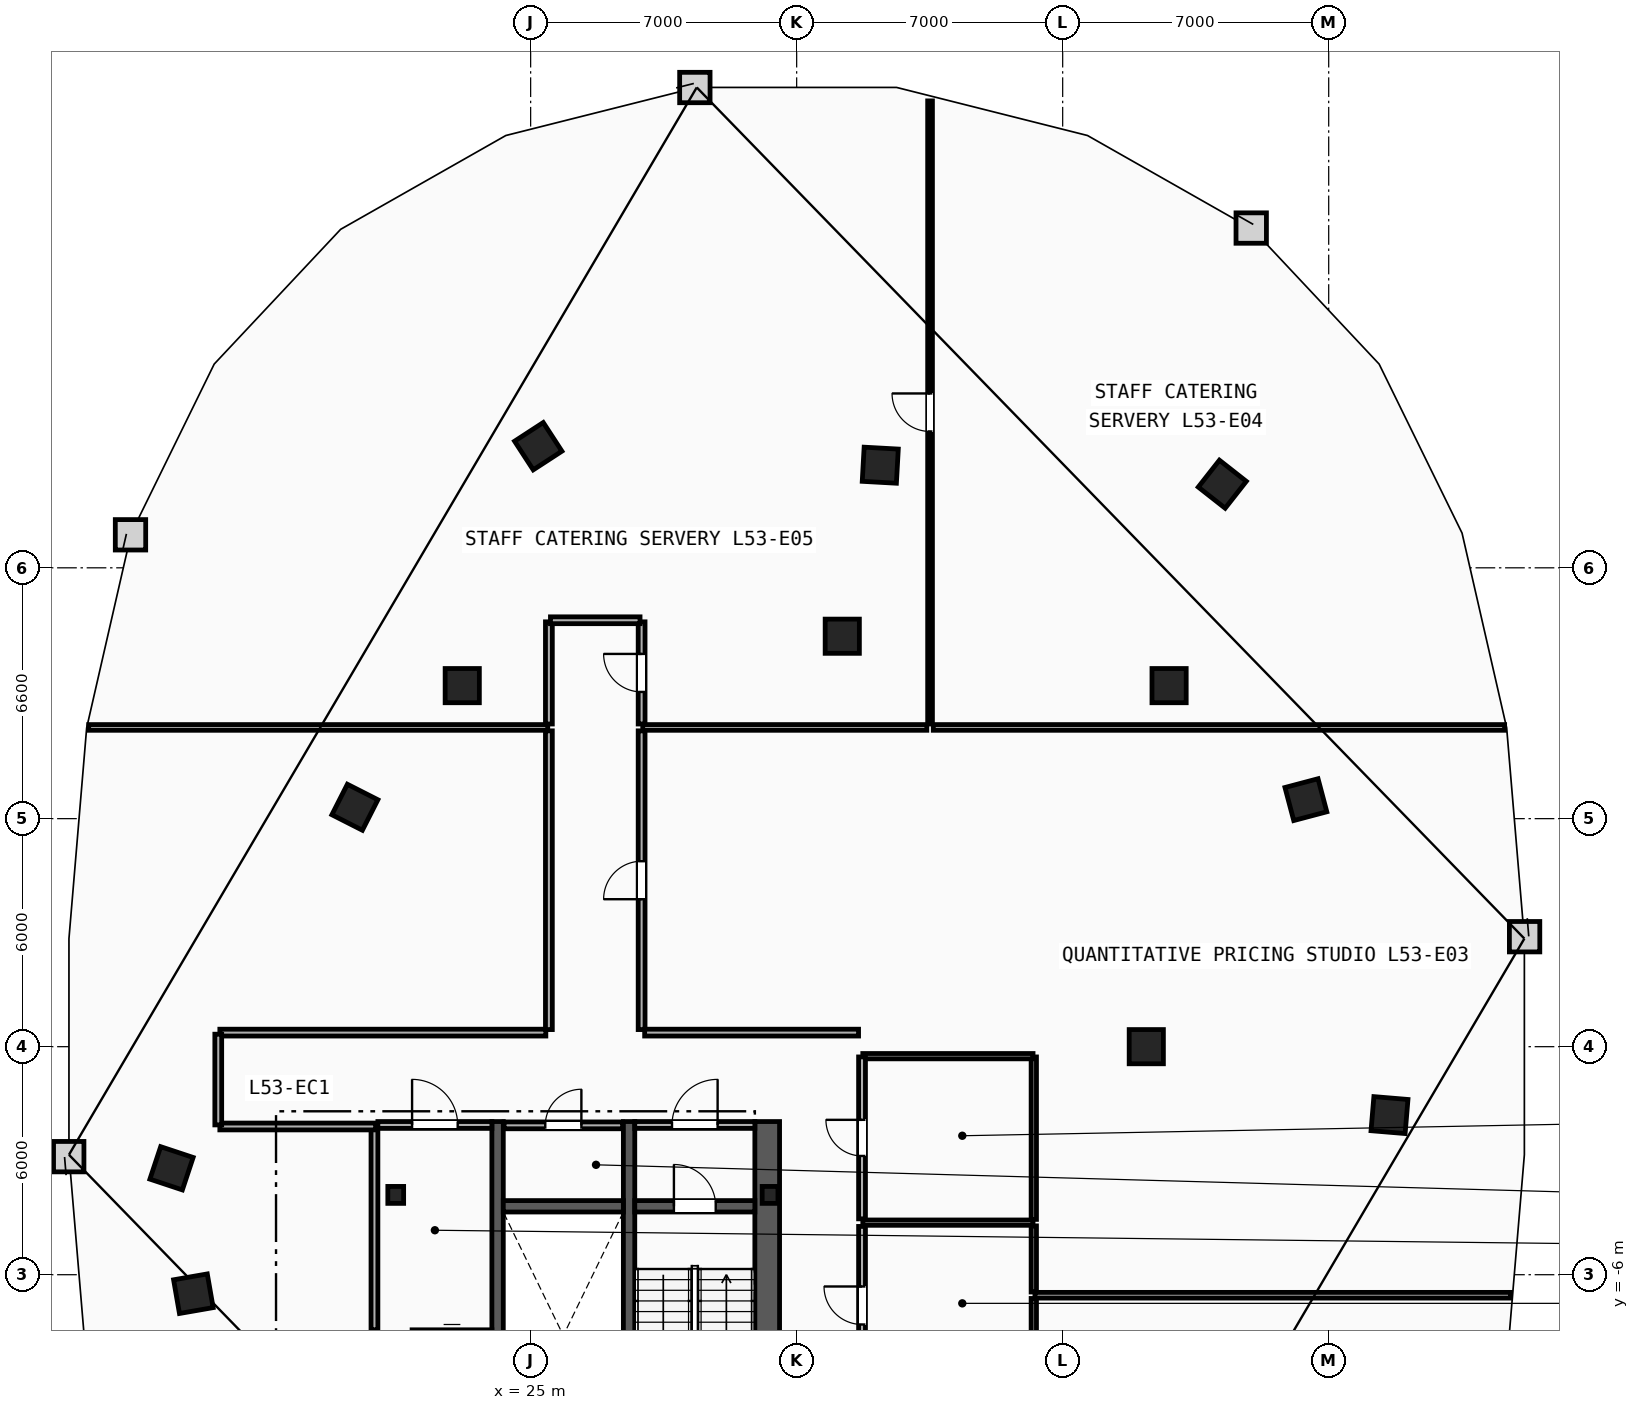
"""IFC4 building model, lengths in metres.
Left out: names, types, materials, properties, quantities, classifications, styles, units other than length and angle.
Written with IfcOpenShell. Run it as: python <this file> out.ifc"""

import sys

from ifc_helpers import new_model, si_unit, direction, frame, frame_2d, origin, origin_2d, place, context, subcontext, project, spatial, rectangle, i_section, extrude, element, fill, save


model = new_model("IFC4")
c1 = context("Model", 3, precision=1e-05, world=origin(), true_north=direction((0.0, 1.0)))
c2 = subcontext(c1, "Body", "Model", "MODEL_VIEW")
j1 = project(units=[si_unit("LENGTHUNIT", "METRE"), si_unit("PLANEANGLEUNIT", "RADIAN")], contexts=[c1])
p1 = place(None, origin())
s1 = spatial("IfcSite", under=j1, at=p1, CompositionType="ELEMENT")
p2 = place(p1, origin())
s2 = spatial("IfcBuilding", under=s1, at=p2, CompositionType="ELEMENT")
p3 = place(p2, frame((0.0, 0.0, 202.6)))
s3 = spatial("IfcBuildingStorey", under=s2, at=p3, CompositionType="ELEMENT", Elevation=202.6)
for number, where, z_axis, x_axis in (
    (1, (31.3, -3.9, 0.0), (0.0, 0.0, 1.0), (1.0, 0.0, 0.0)),
    (2, (21.45, -3.9, 0.0), (0.0, 0.0, 1.0), (1.0, 0.0, 0.0)),
):
    element("IfcColumn", number, at=place(p3, frame(where, z_axis=z_axis, x_axis=x_axis)), inside=s3, PredefinedType="COLUMN", context=c2, shape_type="SweptSolid", body=[
        extrude(i_section(OverallWidth=0.416, OverallDepth=0.446, WebThickness=0.039, FlangeThickness=0.063, FilletRadius=0.018, at=origin_2d()), origin(), (0.0, 0.0, 1.0), 3.6),
    ])
for number, where, z_axis, x_axis in (
    (3, (41.2, 0.0, 0.0), (0.0, 0.0, 1.0), (1.0, 0.0, 0.0)),
    (4, (41.8, 9.5, 0.0), (0.0, 0.0, 1.0), (1.0, 0.0, 0.0)),
    (5, (33.2, 10.8, 0.0), (0.0, 0.0, 1.0), (1.0, 0.0, 0.0)),
    (6, (23.2, 9.5, 0.0), (0.0, 0.0, 1.0), (1.0, 0.0, 0.0)),
    (7, (15.55, -3.2, 0.0), (0.0, 0.0, 1.0), (-0.315, -0.949, 0.0)),
    (8, (16.125, -6.5, 0.0), (0.0, 0.0, 1.0), (0.172, -0.985, 0.0)),
    (9, (47.6, -1.8, 0.0), (0.0, 0.0, 1.0), (0.084, 0.997, 0.0)),
    (10, (45.4, 6.5, 0.0), (0.0, 0.0, 1.0), (-0.256, 0.967, 0.0)),
    (11, (43.2, 14.8, 0.0), (0.0, 0.0, 1.0), (-0.786, 0.618, 0.0)),
    (12, (34.2, 15.3, 0.0), (0.0, 0.0, 1.0), (-0.998, 0.055, 0.0)),
    (13, (25.2, 15.8, 0.0), (0.0, 0.0, 1.0), (-0.838, -0.546, 0.0)),
    (14, (20.375, 6.3, 0.0), (0.0, 0.0, 1.0), (-0.453, -0.892, 0.0)),
):
    element("IfcColumn", number, at=place(p3, frame(where, z_axis=z_axis, x_axis=x_axis)), inside=s3, PredefinedType="COLUMN", context=c2, shape_type="SweptSolid", body=[
        extrude(rectangle(XDim=0.9, YDim=0.9, at=origin_2d()), origin(), (0.0, 0.0, 1.0), 3.6),
    ])
p4 = place(p3, frame((31.225, -15.3, 0.0), z_axis=(0.0, 0.0, 1.0), x_axis=(0.0, 1.0, 0.0)))
e15 = element("IfcWall", 15, at=p4, inside=s3, PredefinedType="SHEAR", context=c2, shape_type="SweptSolid", body=[
    extrude(rectangle(XDim=13.33, YDim=0.65, at=frame_2d((6.665, 0.0))), origin(), (0.0, 0.0, 1.0), 3.34),
])
for number, where, z_axis, x_axis in (
    (16, (27.59, -12.65, 0.0), (0.0, 0.0, 1.0), (0.0, 1.0, 0.0)),
    (17, (24.13, -12.65, 0.0), (0.0, 0.0, 1.0), (0.0, 1.0, 0.0)),
):
    element("IfcWall", number, at=place(p3, frame(where, z_axis=z_axis, x_axis=x_axis)), inside=s3, PredefinedType="SHEAR", context=c2, shape_type="SweptSolid", body=[
        extrude(rectangle(XDim=10.68, YDim=0.3, at=frame_2d((5.34, 0.0))), origin(), (0.0, 0.0, 1.0), 3.34),
    ])
p5 = place(p3, frame((27.74, -4.2, 0.0), z_axis=(0.0, 0.0, 1.0), x_axis=(1.0, 0.0, 0.0)))
e18 = element("IfcWall", 18, at=p5, inside=s3, PredefinedType="SHEAR", context=c2, shape_type="SweptSolid", body=[
    extrude(rectangle(XDim=3.16, YDim=0.3, at=frame_2d((1.58, 0.0))), origin(), (0.0, 0.0, 1.0), 3.34),
])
p6 = place(p5, frame((1.03, 0.0, 0.0)))
e19 = element("IfcOpeningElement", 19, at=p6, cuts=e18, PredefinedType="OPENING", context=c2, shape_type="SweptSolid", body=[
    extrude(rectangle(XDim=1.1, YDim=2.15, at=frame_2d((0.55, 1.075))), frame((0.0, 0.16, 0.0), z_axis=(0.0, -1.0, 0.0), x_axis=(1.0, 0.0, 0.0)), (0.0, 0.0, 1.0), 0.32),
])
p7 = place(p3, frame((24.28, -4.2, 0.0), z_axis=(0.0, 0.0, 1.0), x_axis=(1.0, 0.0, 0.0)))
e20 = element("IfcWall", 20, at=p7, inside=s3, PredefinedType="SHEAR", context=c2, shape_type="SweptSolid", body=[
    extrude(rectangle(XDim=3.16, YDim=0.3, at=frame_2d((1.58, 0.0))), origin(), (0.0, 0.0, 1.0), 3.34),
])
p8 = place(p3, frame((20.89, -7.45, 0.0), z_axis=(0.0, 0.0, 1.0), x_axis=(0.0, 1.0, 0.0)))
e21 = element("IfcWall", 21, at=p8, inside=s3, PredefinedType="PARTITIONING", context=c2, shape_type="SweptSolid", body=[
    extrude(rectangle(XDim=5.3, YDim=0.18, at=frame_2d((2.65, 0.0))), origin(), (0.0, 0.0, 1.0), 3.34),
])
p9 = place(p3, frame((20.98, -2.06, 0.0), z_axis=(0.0, 0.0, 1.0), x_axis=(1.0, 0.0, 0.0)))
e22 = element("IfcWall", 22, at=p9, inside=s3, PredefinedType="PARTITIONING", context=c2, shape_type="SweptSolid", body=[
    extrude(rectangle(XDim=3.0, YDim=0.18, at=frame_2d((1.5, 0.0))), origin(), (0.0, 0.0, 1.0), 3.34),
])
p10 = place(p9, frame((0.9, 0.0, 0.0)))
e23 = element("IfcOpeningElement", 23, at=p10, cuts=e22, PredefinedType="OPENING", context=c2, shape_type="SweptSolid", body=[
    extrude(rectangle(XDim=1.2, YDim=2.15, at=frame_2d((0.6, 1.075))), frame((0.0, 0.1, 0.0), z_axis=(0.0, -1.0, 0.0), x_axis=(1.0, 0.0, 0.0)), (0.0, 0.0, 1.0), 0.2),
])
p11 = place(p3, frame((27.74, -2.06, 0.0), z_axis=(0.0, 0.0, 1.0), x_axis=(1.0, 0.0, 0.0)))
e24 = element("IfcWall", 24, at=p11, inside=s3, PredefinedType="PARTITIONING", context=c2, shape_type="SweptSolid", body=[
    extrude(rectangle(XDim=3.16, YDim=0.18, at=frame_2d((1.58, 0.0))), origin(), (0.0, 0.0, 1.0), 3.34),
])
p12 = place(p11, frame((0.98, 0.0, 0.0)))
e25 = element("IfcOpeningElement", 25, at=p12, cuts=e24, PredefinedType="OPENING", context=c2, shape_type="SweptSolid", body=[
    extrude(rectangle(XDim=1.2, YDim=2.15, at=frame_2d((0.6, 1.075))), frame((0.0, 0.1, 0.0), z_axis=(0.0, -1.0, 0.0), x_axis=(1.0, 0.0, 0.0)), (0.0, 0.0, 1.0), 0.2),
])
p13 = place(p3, frame((21.88, -7.6, 0.0), z_axis=(0.0, 0.0, 1.0), x_axis=(1.0, 0.0, 0.0)))
e26 = element("IfcWall", 26, at=p13, inside=s3, PredefinedType="SHEAR", context=c2, shape_type="SweptSolid", body=[
    extrude(rectangle(XDim=2.1, YDim=0.3, at=frame_2d((1.05, 0.0))), origin(), (0.0, 0.0, 1.0), 3.34),
])
p14 = place(p13, frame((0.475, 0.0, 0.0)))
e27 = element("IfcOpeningElement", 27, at=p14, cuts=e26, PredefinedType="OPENING", context=c2, shape_type="SweptSolid", body=[
    extrude(rectangle(XDim=1.15, YDim=2.2, at=frame_2d((0.575, 1.1))), frame((0.0, 0.16, 0.0), z_axis=(0.0, -1.0, 0.0), x_axis=(1.0, 0.0, 0.0)), (0.0, 0.0, 1.0), 0.32),
])
p15 = place(p3, frame((24.3, -2.07, 0.0), z_axis=(0.0, 0.0, 1.0), x_axis=(1.0, 0.0, 0.0)))
e28 = element("IfcWall", 28, at=p15, inside=s3, PredefinedType="PARTITIONING", context=c2, shape_type="SweptSolid", body=[
    extrude(rectangle(XDim=3.12, YDim=0.18, at=frame_2d((1.56, 0.0))), origin(), (0.0, 0.0, 1.0), 3.34),
])
p16 = place(p15, frame((1.085, 0.0, 0.0)))
e29 = element("IfcOpeningElement", 29, at=p16, cuts=e28, PredefinedType="OPENING", context=c2, shape_type="SweptSolid", body=[
    extrude(rectangle(XDim=0.95, YDim=2.1, at=frame_2d((0.475, 1.05))), frame((0.0, 0.1, 0.0), z_axis=(0.0, -1.0, 0.0), x_axis=(1.0, 0.0, 0.0)), (0.0, 0.0, 1.0), 0.2),
])
p17 = place(p3, frame((38.24, -8.89, 0.0), z_axis=(0.0, 0.0, 1.0), x_axis=(0.0, 1.0, 0.0)))
e30 = element("IfcWall", 30, at=p17, inside=s3, PredefinedType="PARTITIONING", context=c2, shape_type="SweptSolid", body=[
    extrude(rectangle(XDim=2.265, YDim=0.14, at=frame_2d((1.132, 0.0))), origin(), (0.0, 0.0, 1.0), 3.34),
])
p18 = place(p3, frame((38.24, -6.455, 0.0), z_axis=(0.0, 0.0, 1.0), x_axis=(0.0, 1.0, 0.0)))
e31 = element("IfcWall", 31, at=p18, inside=s3, PredefinedType="PARTITIONING", context=c2, shape_type="SweptSolid", body=[
    extrude(rectangle(XDim=1.74, YDim=0.14, at=frame_2d((0.87, 0.0))), origin(), (0.0, 0.0, 1.0), 3.34),
])
p19 = place(p3, frame((38.24, -4.545, 0.0), z_axis=(0.0, 0.0, 1.0), x_axis=(0.0, 1.0, 0.0)))
e32 = element("IfcWall", 32, at=p19, inside=s3, PredefinedType="PARTITIONING", context=c2, shape_type="SweptSolid", body=[
    extrude(rectangle(XDim=4.275, YDim=0.14, at=frame_2d((2.137, 0.0))), origin(), (0.0, 0.0, 1.0), 3.34),
])
for number, where, z_axis, x_axis in (
    (33, (33.74, -0.25, 0.0), (0.0, 0.0, 1.0), (1.0, 0.0, 0.0)),
    (34, (33.74, -4.63, 0.0), (0.0, 0.0, 1.0), (1.0, 0.0, 0.0)),
):
    element("IfcWall", number, at=place(p3, frame(where, z_axis=z_axis, x_axis=x_axis)), inside=s3, PredefinedType="PARTITIONING", context=c2, shape_type="SweptSolid", body=[
        extrude(rectangle(XDim=4.48, YDim=0.14, at=frame_2d((2.24, 0.0))), origin(), (0.0, 0.0, 1.0), 3.34),
    ])
p20 = place(p3, frame((33.72, -4.53, 0.0), z_axis=(0.0, 0.0, 1.0), x_axis=(0.0, 1.0, 0.0)))
e35 = element("IfcWall", 35, at=p20, inside=s3, PredefinedType="PARTITIONING", context=c2, shape_type="SweptSolid", body=[
    extrude(rectangle(XDim=4.26, YDim=0.18, at=frame_2d((2.13, 0.0))), origin(), (0.0, 0.0, 1.0), 3.34),
])
p21 = place(p20, frame((1.655, 0.0, 0.0)))
e36 = element("IfcOpeningElement", 36, at=p21, cuts=e35, PredefinedType="OPENING", context=c2, shape_type="SweptSolid", body=[
    extrude(rectangle(XDim=0.95, YDim=2.1, at=frame_2d((0.475, 1.05))), frame((0.0, 0.1, 0.0), z_axis=(0.0, -1.0, 0.0), x_axis=(1.0, 0.0, 0.0)), (0.0, 0.0, 1.0), 0.2),
])
p22 = place(p3, frame((33.72, -8.89, 0.0), z_axis=(0.0, 0.0, 1.0), x_axis=(0.0, 1.0, 0.0)))
e37 = element("IfcWall", 37, at=p22, inside=s3, PredefinedType="PARTITIONING", context=c2, shape_type="SweptSolid", body=[
    extrude(rectangle(XDim=4.16, YDim=0.18, at=frame_2d((2.08, 0.0))), origin(), (0.0, 0.0, 1.0), 3.34),
])
p23 = place(p22, frame((1.58, 0.0, 0.0)))
e38 = element("IfcOpeningElement", 38, at=p23, cuts=e37, PredefinedType="OPENING", context=c2, shape_type="SweptSolid", body=[
    extrude(rectangle(XDim=1.0, YDim=2.15, at=frame_2d((0.5, 1.075))), frame((0.0, 0.1, 0.0), z_axis=(0.0, -1.0, 0.0), x_axis=(1.0, 0.0, 0.0)), (0.0, 0.0, 1.0), 0.2),
])
p24 = place(p3, frame((13.37, 8.4, 0.0), z_axis=(0.0, 0.0, 1.0), x_axis=(1.0, 0.0, 0.0)))
e39 = element("IfcWall", 39, at=p24, inside=s3, PredefinedType="PARTITIONING", context=c2, shape_type="SweptSolid", body=[
    extrude(rectangle(XDim=12.08, YDim=0.15, at=frame_2d((6.04, 0.0))), origin(), (0.0, 0.0, 1.0), 3.34),
])
p25 = place(p3, frame((27.95, 8.4, 0.0), z_axis=(0.0, 0.0, 1.0), x_axis=(1.0, 0.0, 0.0)))
e40 = element("IfcWall", 40, at=p25, inside=s3, PredefinedType="PARTITIONING", context=c2, shape_type="SweptSolid", body=[
    extrude(rectangle(XDim=7.475, YDim=0.15, at=frame_2d((3.738, 0.0))), origin(), (0.0, 0.0, 1.0), 3.34),
])
p26 = place(p3, frame((35.595, 8.4, 0.0), z_axis=(0.0, 0.0, 1.0), x_axis=(1.0, 0.0, 0.0)))
e41 = element("IfcWall", 41, at=p26, inside=s3, PredefinedType="PARTITIONING", context=c2, shape_type="SweptSolid", body=[
    extrude(rectangle(XDim=15.035, YDim=0.15, at=frame_2d((7.517, 0.0))), origin(), (0.0, 0.0, 1.0), 3.34),
])
p27 = place(p3, frame((38.27, -6.54, 0.0), z_axis=(0.0, 0.0, 1.0), x_axis=(1.0, 0.0, 0.0)))
e42 = element("IfcWall", 42, at=p27, inside=s3, PredefinedType="PARTITIONING", context=c2, shape_type="SweptSolid", body=[
    extrude(rectangle(XDim=12.518, YDim=0.15, at=frame_2d((6.259, 0.0))), origin(), (0.0, 0.0, 1.0), 3.34),
])
p28 = place(p3, frame((25.4, 0.37, 0.0), z_axis=(0.0, 0.0, 1.0), x_axis=(-1.0, 0.0, 0.0)))
e43 = element("IfcWall", 43, at=p28, inside=s3, PredefinedType="PARTITIONING", context=c2, shape_type="SweptSolid", body=[
    extrude(rectangle(XDim=8.578, YDim=0.18, at=frame_2d((4.289, 0.0))), origin(), (0.0, 0.0, 1.0), 3.34),
])
p29 = place(p3, frame((25.48, 8.31, 0.0), z_axis=(0.0, 0.0, 1.0), x_axis=(0.0, -1.0, 0.0)))
e44 = element("IfcWall", 44, at=p29, inside=s3, PredefinedType="PARTITIONING", context=c2, shape_type="SweptSolid", body=[
    extrude(rectangle(XDim=7.86, YDim=0.18, at=frame_2d((3.93, 0.0))), origin(), (0.0, 0.0, 1.0), 3.34),
])
p30 = place(p3, frame((16.822, -2.1, 0.0), z_axis=(0.0, 0.0, 1.0), x_axis=(1.0, 0.0, 0.0)))
e45 = element("IfcWall", 45, at=p30, inside=s3, PredefinedType="PARTITIONING", context=c2, shape_type="SweptSolid", body=[
    extrude(rectangle(XDim=4.098, YDim=0.18, at=frame_2d((2.049, 0.0))), origin(), (0.0, 0.0, 1.0), 3.34),
])
p31 = place(p3, frame((16.78, 0.329, 0.0), z_axis=(0.0, 0.0, 1.0), x_axis=(0.0, -1.0, 0.0)))
e46 = element("IfcWall", 46, at=p31, inside=s3, PredefinedType="PARTITIONING", context=c2, shape_type="SweptSolid", body=[
    extrude(rectangle(XDim=2.387, YDim=0.18, at=frame_2d((1.194, 0.0))), origin(), (0.0, 0.0, 1.0), 3.34),
])
p32 = place(p3, frame((27.92, 0.45, 0.0), z_axis=(0.0, 0.0, 1.0), x_axis=(0.0, 1.0, 0.0)))
e47 = element("IfcWall", 47, at=p32, inside=s3, PredefinedType="PARTITIONING", context=c2, shape_type="SweptSolid", body=[
    extrude(rectangle(XDim=7.86, YDim=0.18, at=frame_2d((3.93, 0.0))), origin(), (0.0, 0.0, 1.0), 3.34),
])
p33 = place(p32, frame((3.43, 0.0, 0.0)))
e48 = element("IfcOpeningElement", 48, at=p33, cuts=e47, PredefinedType="OPENING", context=c2, shape_type="SweptSolid", body=[
    extrude(rectangle(XDim=1.0, YDim=2.15, at=frame_2d((0.5, 1.075))), frame((0.0, 0.1, 0.0), z_axis=(0.0, -1.0, 0.0), x_axis=(1.0, 0.0, 0.0)), (0.0, 0.0, 1.0), 0.2),
])
p34 = place(p3, frame((33.628, 0.37, 0.0), z_axis=(0.0, 0.0, 1.0), x_axis=(-1.0, 0.0, 0.0)))
e49 = element("IfcWall", 49, at=p34, inside=s3, PredefinedType="PARTITIONING", context=c2, shape_type="SweptSolid", body=[
    extrude(rectangle(XDim=5.628, YDim=0.18, at=frame_2d((2.814, 0.0))), origin(), (0.0, 0.0, 1.0), 3.34),
])
p35 = place(p3, frame((27.92, 8.49, 0.0), z_axis=(0.0, 0.0, 1.0), x_axis=(0.0, 1.0, 0.0)))
e50 = element("IfcWall", 50, at=p35, inside=s3, PredefinedType="PARTITIONING", context=c2, shape_type="SweptSolid", body=[
    extrude(rectangle(XDim=2.688, YDim=0.18, at=frame_2d((1.344, 0.0))), origin(), (0.0, 0.0, 1.0), 3.34),
])
p36 = place(p35, frame((0.844, 0.0, 0.0)))
e51 = element("IfcOpeningElement", 51, at=p36, cuts=e50, PredefinedType="OPENING", context=c2, shape_type="SweptSolid", body=[
    extrude(rectangle(XDim=1.0, YDim=2.15, at=frame_2d((0.5, 1.075))), frame((0.0, 0.1, 0.0), z_axis=(0.0, -1.0, 0.0), x_axis=(1.0, 0.0, 0.0)), (0.0, 0.0, 1.0), 0.2),
])
p37 = place(p3, frame((25.48, 11.178, 0.0), z_axis=(0.0, 0.0, 1.0), x_axis=(0.0, -1.0, 0.0)))
e52 = element("IfcWall", 52, at=p37, inside=s3, PredefinedType="PARTITIONING", context=c2, shape_type="SweptSolid", body=[
    extrude(rectangle(XDim=2.688, YDim=0.18, at=frame_2d((1.344, 0.0))), origin(), (0.0, 0.0, 1.0), 3.34),
])
p38 = place(p3, frame((27.878, 11.22, 0.0), z_axis=(0.0, 0.0, 1.0), x_axis=(-1.0, 0.0, 0.0)))
e53 = element("IfcWall", 53, at=p38, inside=s3, PredefinedType="PARTITIONING", context=c2, shape_type="SweptSolid", body=[
    extrude(rectangle(XDim=2.357, YDim=0.18, at=frame_2d((1.178, 0.0))), origin(), (0.0, 0.0, 1.0), 3.34),
])
p39 = place(p3, frame((35.51, 8.49, 0.0), z_axis=(0.0, 0.0, 1.0), x_axis=(0.0, 1.0, 0.0)))
e54 = element("IfcWall", 54, at=p39, inside=s3, PredefinedType="PARTITIONING", context=c2, shape_type="SweptSolid", body=[
    extrude(rectangle(XDim=16.396, YDim=0.125, at=frame_2d((8.198, 0.0))), origin(), (0.0, 0.0, 1.0), 3.34),
])
p40 = place(p39, frame((7.698, 0.0, 0.0)))
e55 = element("IfcOpeningElement", 55, at=p40, cuts=e54, PredefinedType="OPENING", context=c2, shape_type="SweptSolid", body=[
    extrude(rectangle(XDim=1.0, YDim=2.15, at=frame_2d((0.5, 1.075))), frame((0.0, 0.073, 0.0), z_axis=(0.0, -1.0, 0.0), x_axis=(1.0, 0.0, 0.0)), (0.0, 0.0, 1.0), 0.145),
])
p41 = place(p6, origin())
e56 = element("IfcDoor", 56, at=p41, inside=s3, OperationType="SINGLE_SWING_LEFT", PredefinedType="DOOR", context=c2, shape_type="SweptSolid", body=[
    extrude(rectangle(XDim=1.1, YDim=2.15, at=frame_2d((0.55, 1.075))), frame((0.0, 0.025, 0.0), z_axis=(0.0, -1.0, 0.0), x_axis=(1.0, 0.0, 0.0)), (0.0, 0.0, 1.0), 0.05),
])
fill(e19, e56)
p42 = place(p10, origin())
e57 = element("IfcDoor", 57, at=p42, inside=s3, OperationType="SINGLE_SWING_LEFT", PredefinedType="DOOR", context=c2, shape_type="SweptSolid", body=[
    extrude(rectangle(XDim=1.2, YDim=2.15, at=frame_2d((0.6, 1.075))), frame((0.0, 0.025, 0.0), z_axis=(0.0, -1.0, 0.0), x_axis=(1.0, 0.0, 0.0)), (0.0, 0.0, 1.0), 0.05),
])
fill(e23, e57)
p43 = place(p12, origin())
e58 = element("IfcDoor", 58, at=p43, inside=s3, OperationType="SINGLE_SWING_RIGHT", PredefinedType="DOOR", context=c2, shape_type="SweptSolid", body=[
    extrude(rectangle(XDim=1.2, YDim=2.15, at=frame_2d((0.6, 1.075))), frame((0.0, 0.025, 0.0), z_axis=(0.0, -1.0, 0.0), x_axis=(1.0, 0.0, 0.0)), (0.0, 0.0, 1.0), 0.05),
])
fill(e25, e58)
p44 = place(p40, origin())
e59 = element("IfcDoor", 59, at=p44, inside=s3, OperationType="SINGLE_SWING_RIGHT", PredefinedType="DOOR", context=c2, shape_type="SweptSolid", body=[
    extrude(rectangle(XDim=1.0, YDim=2.15, at=frame_2d((0.5, 1.075))), frame((0.0, 0.025, 0.0), z_axis=(0.0, -1.0, 0.0), x_axis=(1.0, 0.0, 0.0)), (0.0, 0.0, 1.0), 0.05),
])
fill(e55, e59)
p45 = place(p33, origin())
e60 = element("IfcDoor", 60, at=p45, inside=s3, OperationType="SINGLE_SWING_LEFT", PredefinedType="DOOR", context=c2, shape_type="SweptSolid", body=[
    extrude(rectangle(XDim=1.0, YDim=2.15, at=frame_2d((0.5, 1.075))), frame((0.0, 0.025, 0.0), z_axis=(0.0, -1.0, 0.0), x_axis=(1.0, 0.0, 0.0)), (0.0, 0.0, 1.0), 0.05),
])
fill(e48, e60)
p46 = place(p21, origin())
e61 = element("IfcDoor", 61, at=p46, inside=s3, OperationType="SINGLE_SWING_RIGHT", PredefinedType="DOOR", context=c2, shape_type="SweptSolid", body=[
    extrude(rectangle(XDim=0.95, YDim=2.1, at=frame_2d((0.475, 1.05))), frame((0.0, 0.025, 0.0), z_axis=(0.0, -1.0, 0.0), x_axis=(1.0, 0.0, 0.0)), (0.0, 0.0, 1.0), 0.05),
])
fill(e36, e61)
p47 = place(p23, origin())
e62 = element("IfcDoor", 62, at=p47, inside=s3, OperationType="SINGLE_SWING_RIGHT", PredefinedType="DOOR", context=c2, shape_type="SweptSolid", body=[
    extrude(rectangle(XDim=1.0, YDim=2.15, at=frame_2d((0.5, 1.075))), frame((0.0, 0.025, 0.0), z_axis=(0.0, -1.0, 0.0), x_axis=(1.0, 0.0, 0.0)), (0.0, 0.0, 1.0), 0.05),
])
fill(e38, e62)
p48 = place(p16, origin())
e63 = element("IfcDoor", 63, at=p48, inside=s3, OperationType="SINGLE_SWING_RIGHT", PredefinedType="DOOR", context=c2, shape_type="SweptSolid", body=[
    extrude(rectangle(XDim=0.95, YDim=2.1, at=frame_2d((0.475, 1.05))), frame((0.0, 0.025, 0.0), z_axis=(0.0, -1.0, 0.0), x_axis=(1.0, 0.0, 0.0)), (0.0, 0.0, 1.0), 0.05),
])
fill(e29, e63)
p49 = place(p36, origin())
e64 = element("IfcDoor", 64, at=p49, inside=s3, OperationType="SINGLE_SWING_RIGHT", PredefinedType="DOOR", context=c2, shape_type="SweptSolid", body=[
    extrude(rectangle(XDim=1.0, YDim=2.15, at=frame_2d((0.5, 1.075))), frame((0.0, 0.025, 0.0), z_axis=(0.0, -1.0, 0.0), x_axis=(1.0, 0.0, 0.0)), (0.0, 0.0, 1.0), 0.05),
])
fill(e51, e64)
save(model, sys.argv[1])
